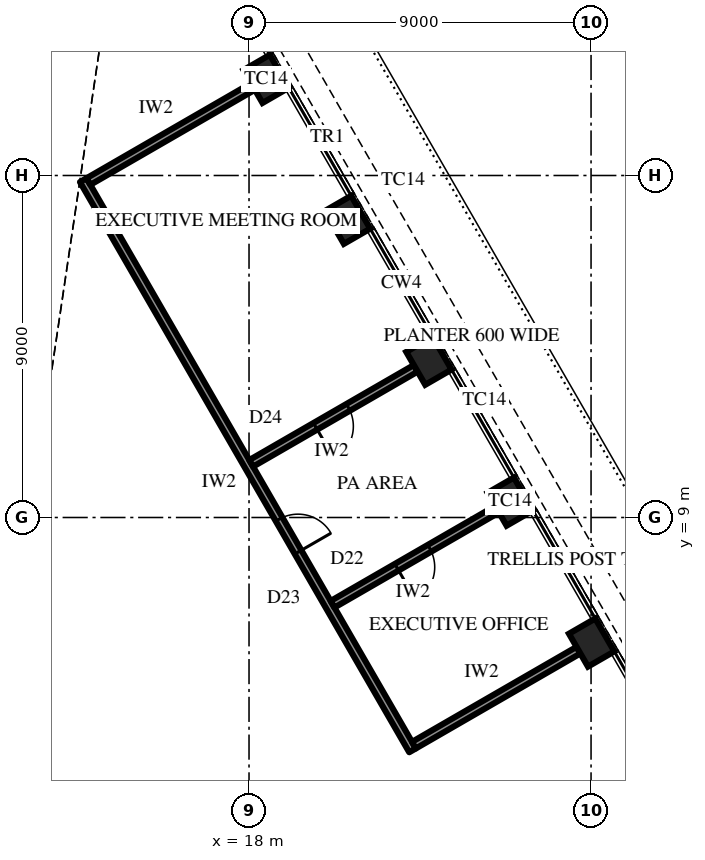
"""IFC4 building model, lengths in metres.
Left out: names, types, materials, properties, quantities, classifications, styles, units other than length and angle.
Written with IfcOpenShell. Run it as: python <this file> out.ifc"""

import sys

from ifc_helpers import new_model, si_unit, direction, frame, frame_2d, origin, origin_2d, place, context, subcontext, project, spatial, rectangle, extrude, element, fill, save


model = new_model("IFC4")
c1 = context("Model", 3, precision=1e-05, world=origin(), true_north=direction((0.0, 1.0)))
c2 = subcontext(c1, "Body", "Model", "MODEL_VIEW")
j1 = project(units=[si_unit("LENGTHUNIT", "METRE"), si_unit("PLANEANGLEUNIT", "RADIAN")], contexts=[c1])
p1 = place(None, origin())
s1 = spatial("IfcSite", under=j1, at=p1, CompositionType="ELEMENT")
p2 = place(p1, origin())
s2 = spatial("IfcBuilding", under=s1, at=p2, CompositionType="ELEMENT")
p3 = place(p2, frame((0.0, 0.0, 340.9)))
s3 = spatial("IfcBuildingStorey", under=s2, at=p3, CompositionType="ELEMENT", Elevation=340.9)
for number, where, z_axis, x_axis in (
    (1, (27.015, 5.708, 0.0), (0.0, 0.0, 1.0), (-0.5, 0.866, 0.0)),
    (2, (24.874, 9.417, 0.0), (0.0, 0.0, 1.0), (-0.5, 0.866, 0.0)),
    (3, (22.733, 13.125, 0.0), (0.0, 0.0, 1.0), (-0.5, 0.866, 0.0)),
    (4, (20.592, 16.833, 0.0), (0.0, 0.0, 1.0), (-0.5, 0.866, 0.0)),
    (5, (18.451, 20.542, 0.0), (0.0, 0.0, 1.0), (-0.5, 0.866, 0.0)),
):
    element("IfcColumn", number, at=place(p3, frame(where, z_axis=z_axis, x_axis=x_axis)), inside=s3, PredefinedType="COLUMN", context=c2, shape_type="SweptSolid", body=[
        extrude(rectangle(XDim=1.0, YDim=0.8, at=origin_2d()), origin(), (0.0, 0.0, 1.0), 4.2),
    ])
p4 = place(p3, frame((22.302, 2.872, 0.0), z_axis=(0.0, 0.0, 1.0), x_axis=(-0.500006217173, 0.866021814268, 0.0)))
e6 = element("IfcWall", 6, at=p4, inside=s3, PredefinedType="PARTITIONING", context=c2, shape_type="SweptSolid", body=[
    extrude(rectangle(XDim=17.328, YDim=0.2, at=frame_2d((8.664, 0.0))), origin(), (0.0, 0.0, 1.0), 4.0),
])
p5 = place(p4, frame((6.023, 0.0, 0.0)))
e7 = element("IfcOpeningElement", 7, at=p5, cuts=e6, PredefinedType="OPENING", context=c2, shape_type="SweptSolid", body=[
    extrude(rectangle(XDim=1.0, YDim=2.2, at=frame_2d((0.5, 1.1))), frame((0.0, 0.11, 0.0), z_axis=(0.0, -1.0, 0.0), x_axis=(1.0, 0.0, 0.0)), (0.0, 0.0, 1.0), 0.22),
])
p6 = place(p3, frame((22.339, 3.008, 0.0), z_axis=(0.0, 0.0, 1.0), x_axis=(0.866022959057, 0.500004234368, 0.0)))
e8 = element("IfcWall", 8, at=p6, inside=s3, PredefinedType="PARTITIONING", context=c2, shape_type="SweptSolid", body=[
    extrude(rectangle(XDim=5.0, YDim=0.2, at=frame_2d((2.5, 0.0))), origin(), (0.0, 0.0, 1.0), 3.082),
])
p7 = place(p3, frame((20.198, 6.717, 0.0), z_axis=(0.0, 0.0, 1.0), x_axis=(0.866022959057, 0.500004234368, 0.0)))
e9 = element("IfcWall", 9, at=p7, inside=s3, PredefinedType="PARTITIONING", context=c2, shape_type="SweptSolid", body=[
    extrude(rectangle(XDim=5.0, YDim=0.2, at=frame_2d((2.5, 0.0))), origin(), (0.0, 0.0, 1.0), 2.992),
])
p8 = place(p7, frame((1.95, 0.0, 0.0)))
e10 = element("IfcOpeningElement", 10, at=p8, cuts=e9, PredefinedType="OPENING", context=c2, shape_type="SweptSolid", body=[
    extrude(rectangle(XDim=1.0, YDim=2.2, at=frame_2d((0.5, 1.1))), frame((0.0, 0.11, 0.0), z_axis=(0.0, -1.0, 0.0), x_axis=(1.0, 0.0, 0.0)), (0.0, 0.0, 1.0), 0.22),
])
p9 = place(p3, frame((18.057, 10.425, 0.0), z_axis=(0.0, 0.0, 1.0), x_axis=(0.866022959057, 0.500004234368, 0.0)))
e11 = element("IfcWall", 11, at=p9, inside=s3, PredefinedType="PARTITIONING", context=c2, shape_type="SweptSolid", body=[
    extrude(rectangle(XDim=5.0, YDim=0.2, at=frame_2d((2.5, 0.0))), origin(), (0.0, 0.0, 1.0), 3.082),
])
p10 = place(p9, frame((1.95, 0.0, 0.0)))
e12 = element("IfcOpeningElement", 12, at=p10, cuts=e11, PredefinedType="OPENING", context=c2, shape_type="SweptSolid", body=[
    extrude(rectangle(XDim=1.0, YDim=2.2, at=frame_2d((0.5, 1.1))), frame((0.0, 0.11, 0.0), z_axis=(0.0, -1.0, 0.0), x_axis=(1.0, 0.0, 0.0)), (0.0, 0.0, 1.0), 0.22),
])
p11 = place(p3, frame((13.775, 17.842, 0.0), z_axis=(0.0, 0.0, 1.0), x_axis=(0.866022959057, 0.500004234368, 0.0)))
e13 = element("IfcWall", 13, at=p11, inside=s3, PredefinedType="PARTITIONING", context=c2, shape_type="SweptSolid", body=[
    extrude(rectangle(XDim=5.0, YDim=0.2, at=frame_2d((2.5, 0.0))), origin(), (0.0, 0.0, 1.0), 3.082),
])
p12 = place(p8, frame((1.0, 0.0, 0.0), z_axis=(0.0, 0.0, 1.0), x_axis=(-1.0, 0.0, 0.0)))
e14 = element("IfcDoor", 14, at=p12, inside=s3, OperationType="SINGLE_SWING_LEFT", PredefinedType="DOOR", context=c2, shape_type="SweptSolid", body=[
    extrude(rectangle(XDim=1.0, YDim=2.2, at=frame_2d((0.5, 1.1))), frame((0.0, 0.025, 0.0), z_axis=(0.0, -1.0, 0.0), x_axis=(1.0, 0.0, 0.0)), (0.0, 0.0, 1.0), 0.05),
])
fill(e10, e14)
p13 = place(p5, frame((1.0, 0.0, 0.0), z_axis=(0.0, 0.0, 1.0), x_axis=(-1.0, 0.0, 0.0)))
e15 = element("IfcDoor", 15, at=p13, inside=s3, OperationType="SINGLE_SWING_LEFT", PredefinedType="DOOR", context=c2, shape_type="SweptSolid", body=[
    extrude(rectangle(XDim=1.0, YDim=2.2, at=frame_2d((0.5, 1.1))), frame((0.0, 0.025, 0.0), z_axis=(0.0, -1.0, 0.0), x_axis=(1.0, 0.0, 0.0)), (0.0, 0.0, 1.0), 0.05),
])
fill(e7, e15)
p14 = place(p10, frame((1.0, 0.0, 0.0), z_axis=(0.0, 0.0, 1.0), x_axis=(-1.0, 0.0, 0.0)))
e16 = element("IfcDoor", 16, at=p14, inside=s3, OperationType="SINGLE_SWING_LEFT", PredefinedType="DOOR", context=c2, shape_type="SweptSolid", body=[
    extrude(rectangle(XDim=1.0, YDim=2.2, at=frame_2d((0.5, 1.1))), frame((0.0, 0.025, 0.0), z_axis=(0.0, -1.0, 0.0), x_axis=(1.0, 0.0, 0.0)), (0.0, 0.0, 1.0), 0.05),
])
fill(e12, e16)
save(model, sys.argv[1])
